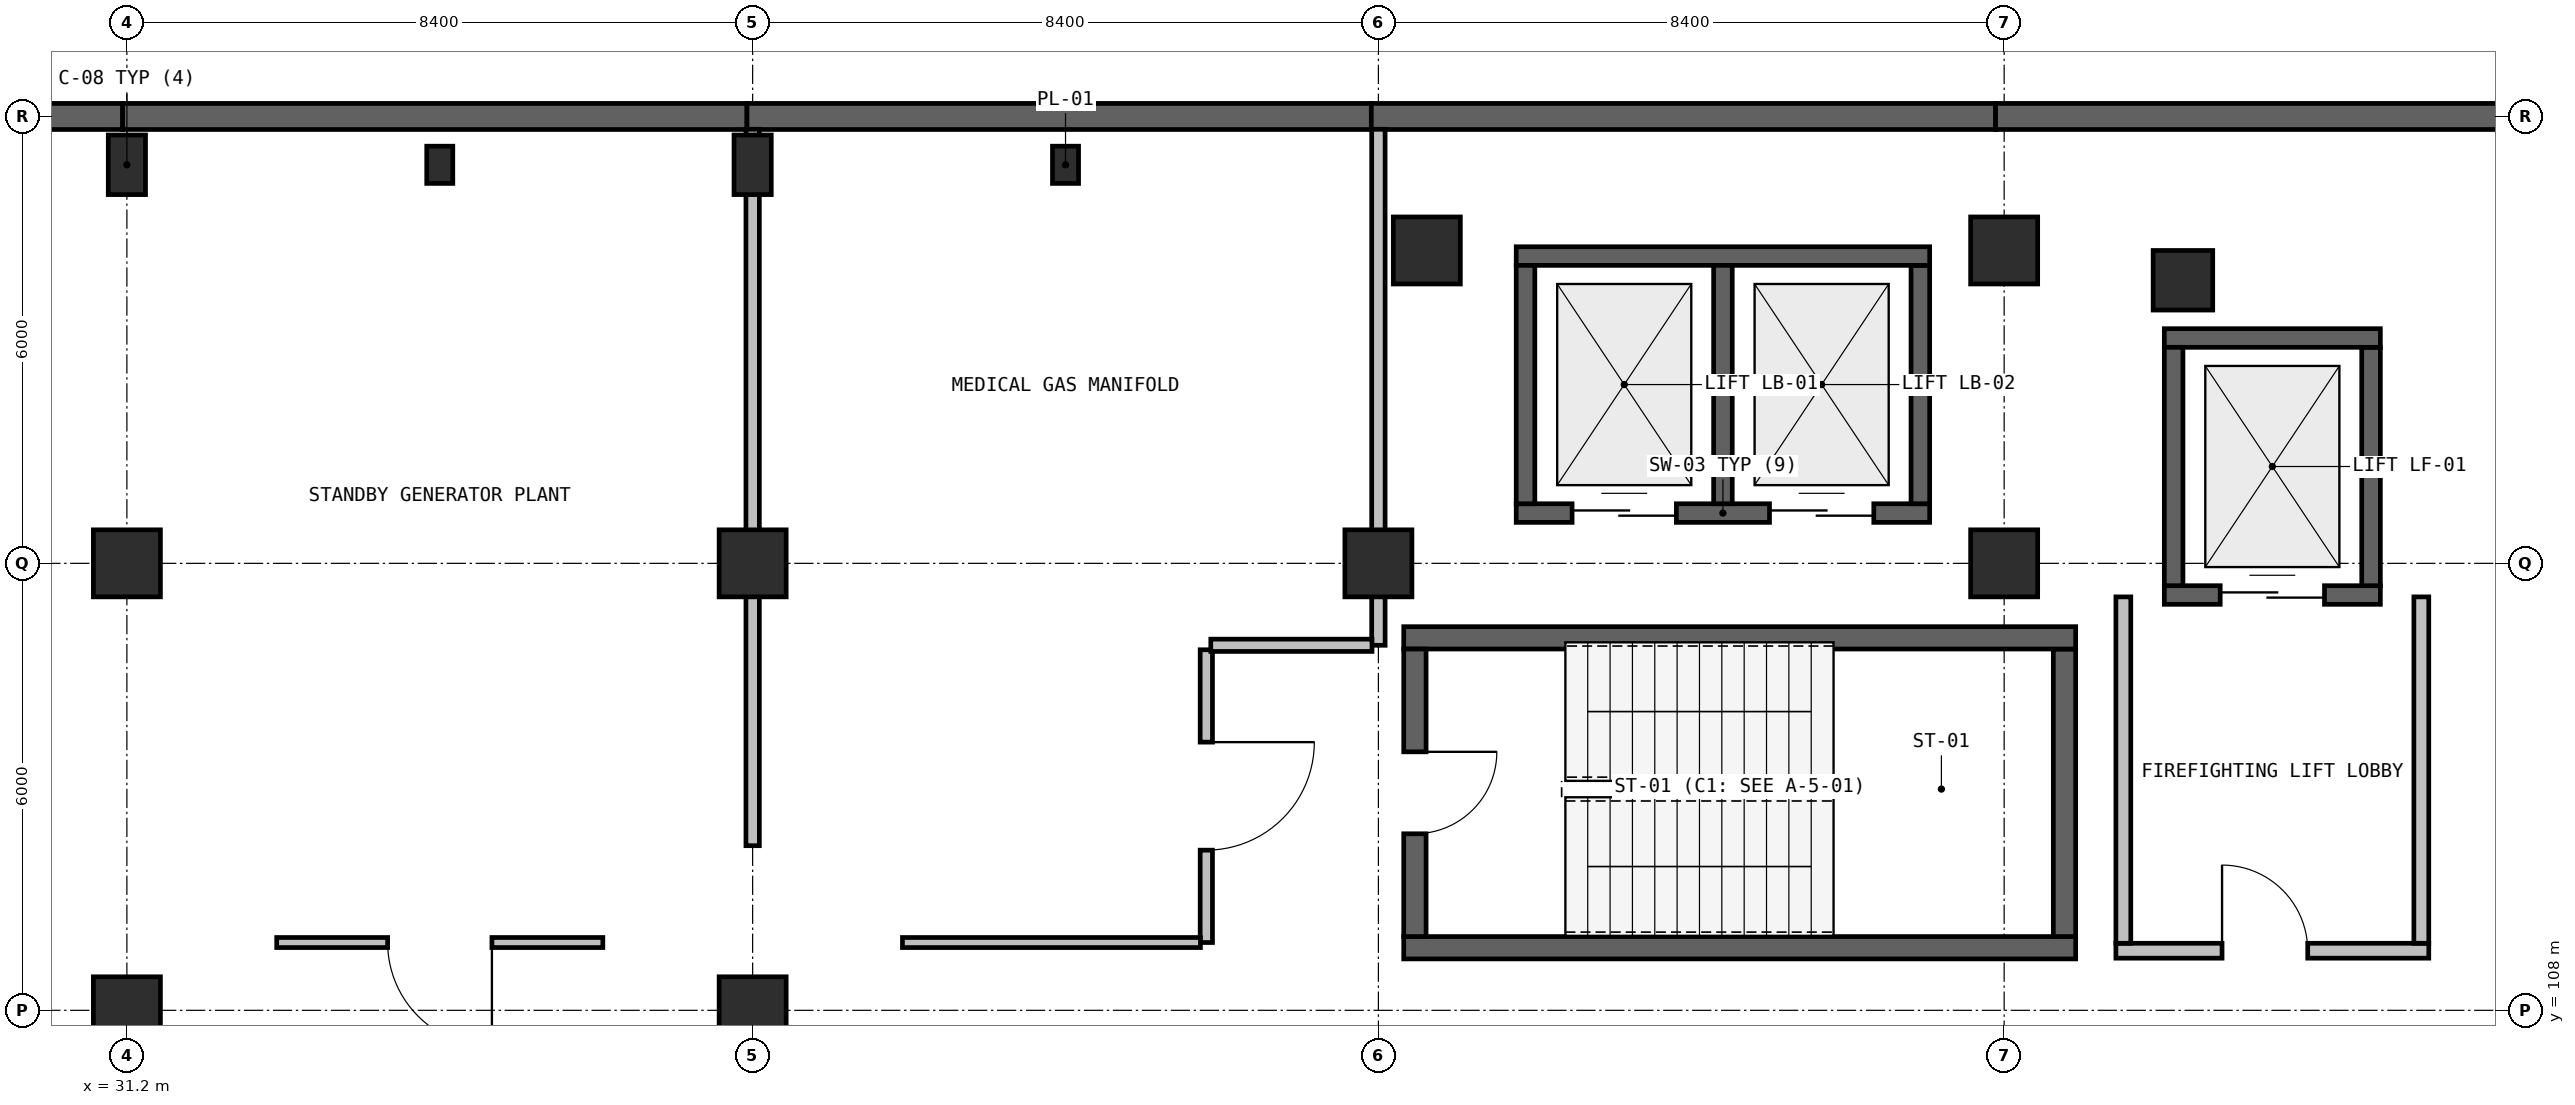
"""IFC4 building model, lengths in metres.
Left out: names, types, materials, properties, quantities, classifications, styles, units other than length and angle.
Written with IfcOpenShell. Run it as: python <this file> out.ifc"""

import sys

from ifc_helpers import new_model, si_unit, direction, frame, frame_2d, origin, origin_2d, place, context, subcontext, project, spatial, rectangle, extrude, element, fill, save


model = new_model("IFC4")
c1 = context("Model", 3, precision=1e-05, world=origin(), true_north=direction((0.0, 1.0)))
c2 = subcontext(c1, "Body", "Model", "MODEL_VIEW")
j1 = project(units=[si_unit("LENGTHUNIT", "METRE"), si_unit("PLANEANGLEUNIT", "RADIAN")], contexts=[c1])
p1 = place(None, origin())
s1 = spatial("IfcSite", under=j1, at=p1, CompositionType="ELEMENT")
p2 = place(p1, origin())
s2 = spatial("IfcBuilding", under=s1, at=p2, CompositionType="ELEMENT")
p3 = place(p2, frame((0.0, 0.0, -4.8)))
s3 = spatial("IfcBuildingStorey", under=s2, at=p3, CompositionType="ELEMENT", Elevation=-4.8)
p4 = place(p3, frame((58.8, 117.8, 0.0), z_axis=(0.0, 0.0, 1.0), x_axis=(1.0, 0.0, 0.0)))
e1 = element("IfcColumn", 1, at=p4, inside=s3, PredefinedType="COLUMN", context=c2, shape_type="SweptSolid", body=[
    extrude(rectangle(XDim=0.8, YDim=0.8, at=origin_2d()), origin(), (0.0, 0.0, 1.0), 4.8),
])
for number, where, z_axis, x_axis in (
    (2, (48.65, 118.2, 0.0), (0.0, 0.0, 1.0), (1.0, 0.0, 0.0)),
    (3, (56.4, 118.2, 0.0), (0.0, 0.0, 1.0), (1.0, 0.0, 0.0)),
    (4, (31.2, 108.0, 0.0), (0.0, 0.0, 1.0), (1.0, 0.0, 0.0)),
    (5, (31.2, 114.0, 0.0), (0.0, 0.0, 1.0), (1.0, 0.0, 0.0)),
):
    element("IfcColumn", number, at=place(p3, frame(where, z_axis=z_axis, x_axis=x_axis)), inside=s3, PredefinedType="COLUMN", context=c2, shape_type="SweptSolid", body=[
        extrude(rectangle(XDim=0.9, YDim=0.9, at=origin_2d()), origin(), (0.0, 0.0, 1.0), 4.8),
    ])
p5 = place(p3, frame((31.2, 119.35, 0.0), z_axis=(0.0, 0.0, 1.0), x_axis=(1.0, 0.0, 0.0)))
e6 = element("IfcColumn", 6, at=p5, inside=s3, PredefinedType="COLUMN", context=c2, shape_type="SweptSolid", body=[
    extrude(rectangle(XDim=0.5, YDim=0.8, at=origin_2d()), origin(), (0.0, 0.0, 1.0), 4.8),
])
for number, where, z_axis, x_axis in (
    (7, (39.6, 108.0, 0.0), (0.0, 0.0, 1.0), (1.0, 0.0, 0.0)),
    (8, (39.6, 114.0, 0.0), (0.0, 0.0, 1.0), (1.0, 0.0, 0.0)),
):
    element("IfcColumn", number, at=place(p3, frame(where, z_axis=z_axis, x_axis=x_axis)), inside=s3, PredefinedType="COLUMN", context=c2, shape_type="SweptSolid", body=[
        extrude(rectangle(XDim=0.9, YDim=0.9, at=origin_2d()), origin(), (0.0, 0.0, 1.0), 4.8),
    ])
p6 = place(p3, frame((39.6, 119.35, 0.0), z_axis=(0.0, 0.0, 1.0), x_axis=(1.0, 0.0, 0.0)))
e9 = element("IfcColumn", 9, at=p6, inside=s3, PredefinedType="COLUMN", context=c2, shape_type="SweptSolid", body=[
    extrude(rectangle(XDim=0.5, YDim=0.8, at=origin_2d()), origin(), (0.0, 0.0, 1.0), 4.8),
])
for number, where, z_axis, x_axis in (
    (10, (48.0, 114.0, 0.0), (0.0, 0.0, 1.0), (1.0, 0.0, 0.0)),
    (11, (56.4, 114.0, 0.0), (0.0, 0.0, 1.0), (1.0, 0.0, 0.0)),
):
    element("IfcColumn", number, at=place(p3, frame(where, z_axis=z_axis, x_axis=x_axis)), inside=s3, PredefinedType="COLUMN", context=c2, shape_type="SweptSolid", body=[
        extrude(rectangle(XDim=0.9, YDim=0.9, at=origin_2d()), origin(), (0.0, 0.0, 1.0), 4.8),
    ])
for number, where, z_axis, x_axis in (
    (12, (35.4, 119.35, 0.0), (0.0, 0.0, 1.0), (1.0, 0.0, 0.0)),
    (13, (43.8, 119.35, 0.0), (0.0, 0.0, 1.0), (1.0, 0.0, 0.0)),
):
    element("IfcColumn", number, at=place(p3, frame(where, z_axis=z_axis, x_axis=x_axis)), inside=s3, PredefinedType="PILASTER", context=c2, shape_type="SweptSolid", body=[
        extrude(rectangle(XDim=0.35, YDim=0.5, at=origin_2d()), origin(), (0.0, 0.0, 1.0), 4.8),
    ])
p7 = place(p3, frame((22.762, 119.999, 0.0), z_axis=(0.0, 0.0, 1.0), x_axis=(1.0, 0.0, 0.0)))
e14 = element("IfcWall", 14, at=p7, inside=s3, PredefinedType="SHEAR", context=c2, shape_type="SweptSolid", body=[
    extrude(rectangle(XDim=8.381, YDim=0.35, at=frame_2d((4.19, 0.0))), origin(), (0.0, 0.0, 1.0), 4.45),
])
p8 = place(p3, frame((31.143, 119.999, 0.0), z_axis=(0.0, 0.0, 1.0), x_axis=(1.0, 0.0, 0.0)))
e15 = element("IfcWall", 15, at=p8, inside=s3, PredefinedType="SHEAR", context=c2, shape_type="SweptSolid", body=[
    extrude(rectangle(XDim=8.381, YDim=0.35, at=frame_2d((4.19, 0.0))), origin(), (0.0, 0.0, 1.0), 4.45),
])
p9 = place(p3, frame((39.524, 119.999, 0.0), z_axis=(0.0, 0.0, 1.0), x_axis=(1.0, 0.0, 0.0)))
e16 = element("IfcWall", 16, at=p9, inside=s3, PredefinedType="SHEAR", context=c2, shape_type="SweptSolid", body=[
    extrude(rectangle(XDim=8.381, YDim=0.35, at=frame_2d((4.19, 0.0))), origin(), (0.0, 0.0, 1.0), 4.45),
])
p10 = place(p3, frame((47.905, 119.999, 0.0), z_axis=(0.0, 0.0, 1.0), x_axis=(1.0, 0.0, 0.0)))
e17 = element("IfcWall", 17, at=p10, inside=s3, PredefinedType="SHEAR", context=c2, shape_type="SweptSolid", body=[
    extrude(rectangle(XDim=8.38, YDim=0.35, at=frame_2d((4.19, 0.0))), origin(), (0.0, 0.0, 1.0), 4.45),
])
p11 = place(p3, frame((56.285, 119.999, 0.0), z_axis=(0.0, 0.0, 1.0), x_axis=(1.0, 0.0, 0.0)))
e18 = element("IfcWall", 18, at=p11, inside=s3, PredefinedType="SHEAR", context=c2, shape_type="SweptSolid", body=[
    extrude(rectangle(XDim=8.381, YDim=0.35, at=frame_2d((4.19, 0.0))), origin(), (0.0, 0.0, 1.0), 4.45),
])
p12 = place(p3, frame((48.34, 108.84, 0.0), z_axis=(0.0, 0.0, 1.0), x_axis=(1.0, 0.0, 0.0)))
e19 = element("IfcWall", 19, at=p12, inside=s3, PredefinedType="SHEAR", context=c2, shape_type="SweptSolid", body=[
    extrude(rectangle(XDim=9.02, YDim=0.3, at=frame_2d((4.51, 0.0))), origin(), (0.0, 0.0, 1.0), 4.45),
])
p13 = place(p3, frame((57.21, 108.99, 0.0), z_axis=(0.0, 0.0, 1.0), x_axis=(0.0, 1.0, 0.0)))
e20 = element("IfcWall", 20, at=p13, inside=s3, PredefinedType="SHEAR", context=c2, shape_type="SweptSolid", body=[
    extrude(rectangle(XDim=3.86, YDim=0.3, at=frame_2d((1.93, 0.0))), origin(), (0.0, 0.0, 1.0), 4.45),
])
p14 = place(p3, frame((57.36, 113.0, 0.0), z_axis=(0.0, 0.0, 1.0), x_axis=(-1.0, 0.0, 0.0)))
e21 = element("IfcWall", 21, at=p14, inside=s3, PredefinedType="SHEAR", context=c2, shape_type="SweptSolid", body=[
    extrude(rectangle(XDim=9.02, YDim=0.3, at=frame_2d((4.51, 0.0))), origin(), (0.0, 0.0, 1.0), 4.45),
])
p15 = place(p3, frame((48.49, 112.85, 0.0), z_axis=(0.0, 0.0, 1.0), x_axis=(0.0, -1.0, 0.0)))
e22 = element("IfcWall", 22, at=p15, inside=s3, PredefinedType="SHEAR", context=c2, shape_type="SweptSolid", body=[
    extrude(rectangle(XDim=3.86, YDim=0.3, at=frame_2d((1.93, 0.0))), origin(), (0.0, 0.0, 1.0), 4.45),
])
p16 = place(p15, frame((1.38, 0.0, 0.0)))
e23 = element("IfcOpeningElement", 23, at=p16, cuts=e22, PredefinedType="OPENING", context=c2, shape_type="SweptSolid", body=[
    extrude(rectangle(XDim=1.1, YDim=2.15, at=frame_2d((0.55, 1.075))), frame((0.0, 0.16, 0.0), z_axis=(0.0, -1.0, 0.0), x_axis=(1.0, 0.0, 0.0)), (0.0, 0.0, 1.0), 0.32),
])
p17 = place(p3, frame((57.9, 108.8, 0.0), z_axis=(0.0, 0.0, 1.0), x_axis=(1.0, 0.0, 0.0)))
e24 = element("IfcWall", 24, at=p17, inside=s3, PredefinedType="SOLIDWALL", context=c2, shape_type="SweptSolid", body=[
    extrude(rectangle(XDim=4.2, YDim=0.2, at=frame_2d((2.1, 0.0))), origin(), (0.0, 0.0, 1.0), 4.45),
])
p18 = place(p17, frame((1.425, 0.0, 0.0)))
e25 = element("IfcOpeningElement", 25, at=p18, cuts=e24, PredefinedType="OPENING", context=c2, shape_type="SweptSolid", body=[
    extrude(rectangle(XDim=1.15, YDim=2.15, at=frame_2d((0.575, 1.075))), frame((0.0, 0.11, 0.0), z_axis=(0.0, -1.0, 0.0), x_axis=(1.0, 0.0, 0.0)), (0.0, 0.0, 1.0), 0.22),
])
for number, where, z_axis, x_axis in (
    (26, (62.0, 108.9, 0.0), (0.0, 0.0, 1.0), (0.0, 1.0, 0.0)),
    (27, (58.0, 113.55, 0.0), (0.0, 0.0, 1.0), (0.0, -1.0, 0.0)),
):
    element("IfcWall", number, at=place(p3, frame(where, z_axis=z_axis, x_axis=x_axis)), inside=s3, PredefinedType="SOLIDWALL", context=c2, shape_type="SweptSolid", body=[
        extrude(rectangle(XDim=4.65, YDim=0.2, at=frame_2d((2.325, 0.0))), origin(), (0.0, 0.0, 1.0), 4.45),
    ])
p19 = place(p3, frame((58.55, 113.575, 0.0), z_axis=(0.0, 0.0, 1.0), x_axis=(1.0, 0.0, 0.0)))
e28 = element("IfcWall", 28, at=p19, inside=s3, PredefinedType="SHEAR", context=c2, shape_type="SweptSolid", body=[
    extrude(rectangle(XDim=2.9, YDim=0.25, at=frame_2d((1.45, 0.0))), origin(), (0.0, 0.0, 1.0), 4.45),
])
p20 = place(p19, frame((0.75, 0.0, 0.0)))
e29 = element("IfcOpeningElement", 29, at=p20, cuts=e28, PredefinedType="OPENING", context=c2, shape_type="SweptSolid", body=[
    extrude(rectangle(XDim=1.4, YDim=2.15, at=frame_2d((0.7, 1.075))), frame((0.0, 0.135, 0.0), z_axis=(0.0, -1.0, 0.0), x_axis=(1.0, 0.0, 0.0)), (0.0, 0.0, 1.0), 0.27),
])
p21 = place(p3, frame((61.325, 113.7, 0.0), z_axis=(0.0, 0.0, 1.0), x_axis=(0.0, 1.0, 0.0)))
e30 = element("IfcWall", 30, at=p21, inside=s3, PredefinedType="SHEAR", context=c2, shape_type="SweptSolid", body=[
    extrude(rectangle(XDim=3.2, YDim=0.25, at=frame_2d((1.6, 0.0))), origin(), (0.0, 0.0, 1.0), 4.45),
])
p22 = place(p3, frame((61.45, 117.025, 0.0), z_axis=(0.0, 0.0, 1.0), x_axis=(-1.0, 0.0, 0.0)))
e31 = element("IfcWall", 31, at=p22, inside=s3, PredefinedType="SHEAR", context=c2, shape_type="SweptSolid", body=[
    extrude(rectangle(XDim=2.9, YDim=0.25, at=frame_2d((1.45, 0.0))), origin(), (0.0, 0.0, 1.0), 4.45),
])
p23 = place(p3, frame((58.675, 116.9, 0.0), z_axis=(0.0, 0.0, 1.0), x_axis=(0.0, -1.0, 0.0)))
e32 = element("IfcWall", 32, at=p23, inside=s3, PredefinedType="SHEAR", context=c2, shape_type="SweptSolid", body=[
    extrude(rectangle(XDim=3.2, YDim=0.25, at=frame_2d((1.6, 0.0))), origin(), (0.0, 0.0, 1.0), 4.45),
])
p24 = place(p3, frame((49.85, 114.675, 0.0), z_axis=(0.0, 0.0, 1.0), x_axis=(1.0, 0.0, 0.0)))
e33 = element("IfcWall", 33, at=p24, inside=s3, PredefinedType="SHEAR", context=c2, shape_type="SweptSolid", body=[
    extrude(rectangle(XDim=5.55, YDim=0.25, at=frame_2d((2.775, 0.0))), origin(), (0.0, 0.0, 1.0), 4.45),
])
p25 = place(p24, frame((0.75, 0.0, 0.0)))
e34 = element("IfcOpeningElement", 34, at=p25, cuts=e33, PredefinedType="OPENING", context=c2, shape_type="SweptSolid", body=[
    extrude(rectangle(XDim=1.4, YDim=2.2, at=frame_2d((0.7, 1.1))), frame((0.0, 0.135, 0.0), z_axis=(0.0, -1.0, 0.0), x_axis=(1.0, 0.0, 0.0)), (0.0, 0.0, 1.0), 0.27),
])
p26 = place(p24, frame((3.4, 0.0, 0.0)))
e35 = element("IfcOpeningElement", 35, at=p26, cuts=e33, PredefinedType="OPENING", context=c2, shape_type="SweptSolid", body=[
    extrude(rectangle(XDim=1.4, YDim=2.2, at=frame_2d((0.7, 1.1))), frame((0.0, 0.135, 0.0), z_axis=(0.0, -1.0, 0.0), x_axis=(1.0, 0.0, 0.0)), (0.0, 0.0, 1.0), 0.27),
])
p27 = place(p3, frame((55.275, 114.8, 0.0), z_axis=(0.0, 0.0, 1.0), x_axis=(0.0, 1.0, 0.0)))
e36 = element("IfcWall", 36, at=p27, inside=s3, PredefinedType="SHEAR", context=c2, shape_type="SweptSolid", body=[
    extrude(rectangle(XDim=3.2, YDim=0.25, at=frame_2d((1.6, 0.0))), origin(), (0.0, 0.0, 1.0), 4.45),
])
p28 = place(p3, frame((55.4, 118.125, 0.0), z_axis=(0.0, 0.0, 1.0), x_axis=(-1.0, 0.0, 0.0)))
e37 = element("IfcWall", 37, at=p28, inside=s3, PredefinedType="SHEAR", context=c2, shape_type="SweptSolid", body=[
    extrude(rectangle(XDim=5.55, YDim=0.25, at=frame_2d((2.775, 0.0))), origin(), (0.0, 0.0, 1.0), 4.45),
])
for number, where, z_axis, x_axis in (
    (38, (49.975, 118.0, 0.0), (0.0, 0.0, 1.0), (0.0, -1.0, 0.0)),
    (39, (52.625, 114.8, 0.0), (0.0, 0.0, 1.0), (0.0, 1.0, 0.0)),
):
    element("IfcWall", number, at=place(p3, frame(where, z_axis=z_axis, x_axis=x_axis)), inside=s3, PredefinedType="SHEAR", context=c2, shape_type="SweptSolid", body=[
        extrude(rectangle(XDim=3.2, YDim=0.25, at=frame_2d((1.6, 0.0))), origin(), (0.0, 0.0, 1.0), 4.45),
    ])
p29 = place(p3, frame((37.589, 108.91, 0.0), z_axis=(0.0, 0.0, 1.0), x_axis=(-1.0, 0.0, 0.0)))
e40 = element("IfcWall", 40, at=p29, inside=s3, PredefinedType="PARTITIONING", context=c2, shape_type="SweptSolid", body=[
    extrude(rectangle(XDim=4.378, YDim=0.135, at=frame_2d((2.189, 0.0))), origin(), (0.0, 0.0, 1.0), 4.45),
])
p30 = place(p29, frame((1.489, 0.0, 0.0)))
e41 = element("IfcOpeningElement", 41, at=p30, cuts=e40, PredefinedType="OPENING", context=c2, shape_type="SweptSolid", body=[
    extrude(rectangle(XDim=1.4, YDim=2.15, at=frame_2d((0.7, 1.075))), frame((0.0, 0.077, 0.0), z_axis=(0.0, -1.0, 0.0), x_axis=(1.0, 0.0, 0.0)), (0.0, 0.0, 1.0), 0.155),
])
p31 = place(p3, frame((39.6, 119.827, 0.0), z_axis=(0.0, 0.0, 1.0), x_axis=(0.0, -1.0, 0.0)))
e42 = element("IfcWall", 42, at=p31, inside=s3, PredefinedType="PARTITIONING", context=c2, shape_type="SweptSolid", body=[
    extrude(rectangle(XDim=9.617, YDim=0.18, at=frame_2d((4.809, 0.0))), origin(), (0.0, 0.0, 1.0), 3.7),
])
p32 = place(p3, frame((45.69, 112.84, 0.0), z_axis=(0.0, 0.0, 1.0), x_axis=(0.0, -1.0, 0.0)))
e43 = element("IfcWall", 43, at=p32, inside=s3, PredefinedType="PARTITIONING", context=c2, shape_type="SweptSolid", body=[
    extrude(rectangle(XDim=3.93, YDim=0.165, at=frame_2d((1.965, 0.0))), origin(), (0.0, 0.0, 1.0), 4.45),
])
p33 = place(p32, frame((1.24, 0.0, 0.0)))
e44 = element("IfcOpeningElement", 44, at=p33, cuts=e43, PredefinedType="OPENING", context=c2, shape_type="SweptSolid", body=[
    extrude(rectangle(XDim=1.45, YDim=2.15, at=frame_2d((0.725, 1.075))), frame((0.0, 0.093, 0.0), z_axis=(0.0, -1.0, 0.0), x_axis=(1.0, 0.0, 0.0)), (0.0, 0.0, 1.0), 0.185),
])
p34 = place(p3, frame((45.611, 108.91, 0.0), z_axis=(0.0, 0.0, 1.0), x_axis=(-1.0, 0.0, 0.0)))
e45 = element("IfcWall", 45, at=p34, inside=s3, PredefinedType="PARTITIONING", context=c2, shape_type="SweptSolid", body=[
    extrude(rectangle(XDim=4.0, YDim=0.135, at=frame_2d((2.0, 0.0))), origin(), (0.0, 0.0, 1.0), 4.45),
])
p35 = place(p3, frame((48.0, 119.827, 0.0), z_axis=(0.0, 0.0, 1.0), x_axis=(0.0, -1.0, 0.0)))
e46 = element("IfcWall", 46, at=p35, inside=s3, PredefinedType="PARTITIONING", context=c2, shape_type="SweptSolid", body=[
    extrude(rectangle(XDim=6.927, YDim=0.18, at=frame_2d((3.463, 0.0))), origin(), (0.0, 0.0, 1.0), 3.7),
])
p36 = place(p3, frame((47.914, 112.9, 0.0), z_axis=(0.0, 0.0, 1.0), x_axis=(-1.0, 0.0, 0.0)))
e47 = element("IfcWall", 47, at=p36, inside=s3, PredefinedType="PARTITIONING", context=c2, shape_type="SweptSolid", body=[
    extrude(rectangle(XDim=2.164, YDim=0.165, at=frame_2d((1.082, 0.0))), origin(), (0.0, 0.0, 1.0), 4.45),
])
p37 = place(p16, origin())
e48 = element("IfcDoor", 48, at=p37, inside=s3, OperationType="SINGLE_SWING_LEFT", PredefinedType="DOOR", context=c2, shape_type="SweptSolid", body=[
    extrude(rectangle(XDim=1.1, YDim=2.15, at=frame_2d((0.55, 1.075))), frame((0.0, 0.025, 0.0), z_axis=(0.0, -1.0, 0.0), x_axis=(1.0, 0.0, 0.0)), (0.0, 0.0, 1.0), 0.05),
])
fill(e23, e48)
p38 = place(p18, origin())
e49 = element("IfcDoor", 49, at=p38, inside=s3, OperationType="SINGLE_SWING_RIGHT", PredefinedType="DOOR", context=c2, shape_type="SweptSolid", body=[
    extrude(rectangle(XDim=1.15, YDim=2.15, at=frame_2d((0.575, 1.075))), frame((0.0, 0.025, 0.0), z_axis=(0.0, -1.0, 0.0), x_axis=(1.0, 0.0, 0.0)), (0.0, 0.0, 1.0), 0.05),
])
fill(e25, e49)
p39 = place(p20, origin())
e50 = element("IfcDoor", 50, at=p39, inside=s3, OperationType="DOUBLE_DOOR_SLIDING", PredefinedType="DOOR", context=c2, shape_type="SweptSolid", body=[
    extrude(rectangle(XDim=1.4, YDim=2.15, at=frame_2d((0.7, 1.075))), frame((0.0, 0.025, 0.0), z_axis=(0.0, -1.0, 0.0), x_axis=(1.0, 0.0, 0.0)), (0.0, 0.0, 1.0), 0.05),
])
fill(e29, e50)
p40 = place(p25, origin())
e51 = element("IfcDoor", 51, at=p40, inside=s3, OperationType="DOUBLE_DOOR_SLIDING", PredefinedType="DOOR", context=c2, shape_type="SweptSolid", body=[
    extrude(rectangle(XDim=1.4, YDim=2.2, at=frame_2d((0.7, 1.1))), frame((0.0, 0.025, 0.0), z_axis=(0.0, -1.0, 0.0), x_axis=(1.0, 0.0, 0.0)), (0.0, 0.0, 1.0), 0.05),
])
fill(e34, e51)
p41 = place(p26, origin())
e52 = element("IfcDoor", 52, at=p41, inside=s3, OperationType="DOUBLE_DOOR_SLIDING", PredefinedType="DOOR", context=c2, shape_type="SweptSolid", body=[
    extrude(rectangle(XDim=1.4, YDim=2.2, at=frame_2d((0.7, 1.1))), frame((0.0, 0.025, 0.0), z_axis=(0.0, -1.0, 0.0), x_axis=(1.0, 0.0, 0.0)), (0.0, 0.0, 1.0), 0.05),
])
fill(e35, e52)
p42 = place(p30, origin())
e53 = element("IfcDoor", 53, at=p42, inside=s3, OperationType="SINGLE_SWING_RIGHT", PredefinedType="DOOR", context=c2, shape_type="SweptSolid", body=[
    extrude(rectangle(XDim=1.4, YDim=2.15, at=frame_2d((0.7, 1.075))), frame((0.0, 0.025, 0.0), z_axis=(0.0, -1.0, 0.0), x_axis=(1.0, 0.0, 0.0)), (0.0, 0.0, 1.0), 0.05),
])
fill(e41, e53)
p43 = place(p33, origin())
e54 = element("IfcDoor", 54, at=p43, inside=s3, OperationType="SINGLE_SWING_LEFT", PredefinedType="DOOR", context=c2, shape_type="SweptSolid", body=[
    extrude(rectangle(XDim=1.45, YDim=2.15, at=frame_2d((0.725, 1.075))), frame((0.0, 0.025, 0.0), z_axis=(0.0, -1.0, 0.0), x_axis=(1.0, 0.0, 0.0)), (0.0, 0.0, 1.0), 0.05),
])
fill(e44, e54)
save(model, sys.argv[1])
